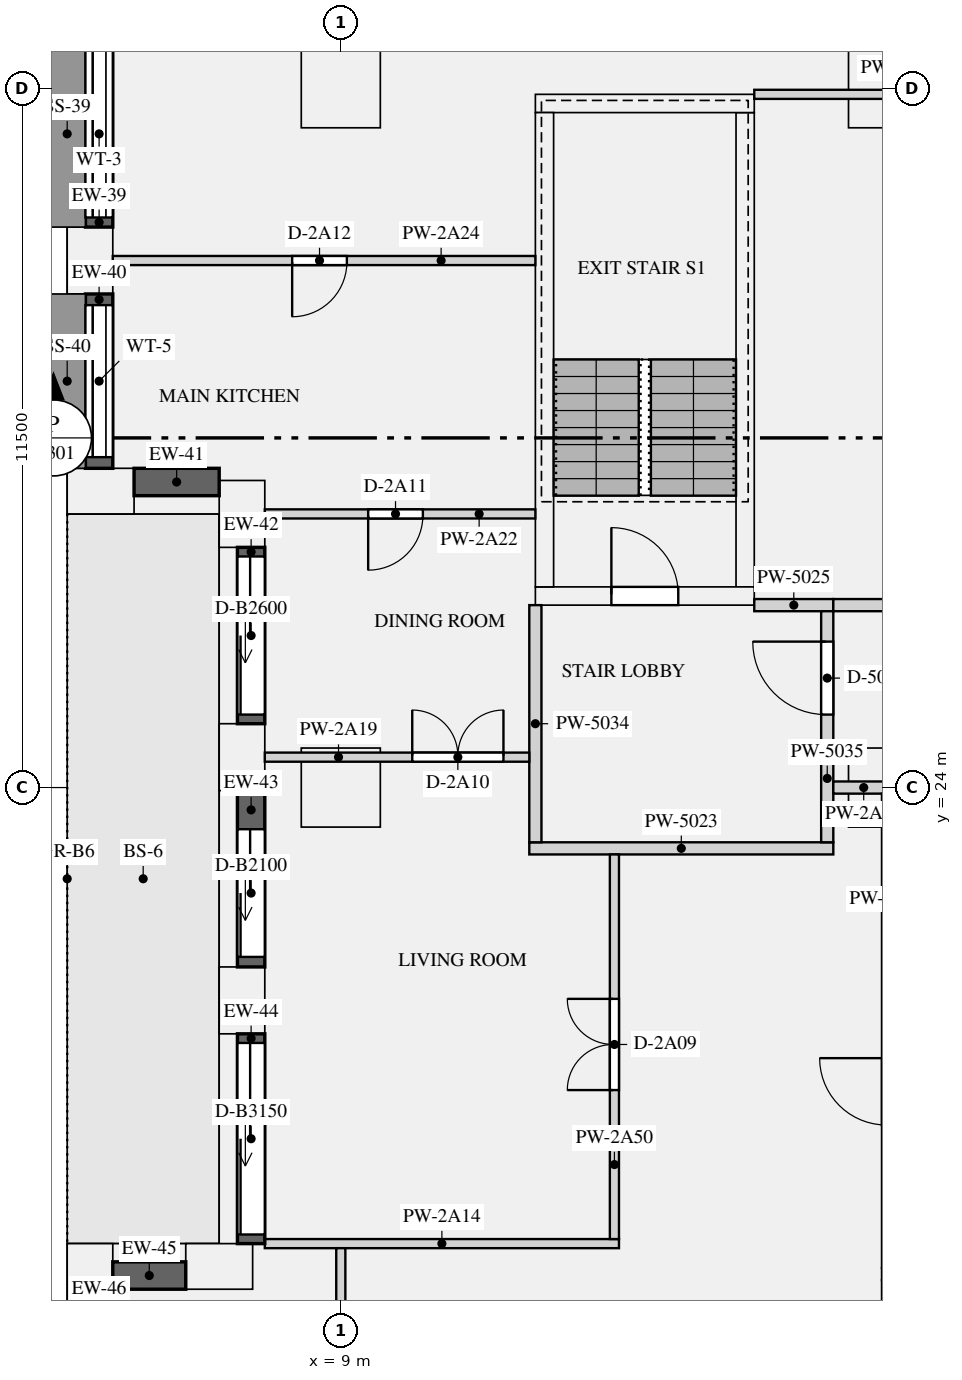
"""IFC4 building model, lengths in metres.
Left out: names, types, materials, properties, quantities, classifications, styles, units other than length and angle.
Written with IfcOpenShell. Run it as: python <this file> out.ifc"""

import sys

from ifc_helpers import new_model, si_unit, direction, frame, frame_2d, origin, origin_2d, place, context, subcontext, project, spatial, rectangle, extrude, element, fill, save


model = new_model("IFC4")
c1 = context("Model", 3, precision=1e-05, world=origin(), true_north=direction((0.0, 1.0)))
c2 = subcontext(c1, "Body", "Model", "MODEL_VIEW")
j1 = project(units=[si_unit("LENGTHUNIT", "METRE"), si_unit("PLANEANGLEUNIT", "RADIAN")], contexts=[c1])
p1 = place(None, origin())
s1 = spatial("IfcSite", under=j1, at=p1, CompositionType="ELEMENT")
p2 = place(p1, origin())
s2 = spatial("IfcBuilding", under=s1, at=p2, CompositionType="ELEMENT")
p3 = place(p2, frame((0.0, 0.0, 83.55)))
s3 = spatial("IfcBuildingStorey", under=s2, at=p3, CompositionType="ELEMENT", Elevation=83.55)
for number, where, z_axis, x_axis in (
    (1, (4.875, 32.667, 0.0), (0.0, 0.0, 1.0), (0.0, -1.0, 0.0)),
    (2, (5.05, 28.875, 0.0), (0.0, 0.0, 1.0), (1.0, 0.0, 0.0)),
    (3, (7.375, 28.5, 0.0), (0.0, 0.0, 1.0), (0.0, -1.0, 0.0)),
    (4, (7.375, 24.5, 0.0), (0.0, 0.0, 1.0), (0.0, -1.0, 0.0)),
    (5, (7.375, 20.5, 0.0), (0.0, 0.0, 1.0), (0.0, -1.0, 0.0)),
    (6, (7.0, 16.125, 0.0), (0.0, 0.0, 1.0), (-1.0, 0.0, 0.0)),
    (7, (4.875, 15.95, 0.0), (0.0, 0.0, 1.0), (0.0, -1.0, 0.0)),
):
    element("IfcColumn", number, at=place(p3, frame(where, z_axis=z_axis, x_axis=x_axis)), inside=s3, PredefinedType="USERDEFINED", context=c2, shape_type="SweptSolid", body=[
        extrude(rectangle(XDim=1.1, YDim=0.75, at=origin_2d()), origin(), (0.0, 0.0, 1.0), 3.15),
    ])
for number, where, z_axis, x_axis in (
    (8, (9.0, 24.0, 0.0), (0.0, 0.0, 1.0), (1.0, 0.0, 0.0)),
    (9, (18.0, 24.0, 0.0), (0.0, 0.0, 1.0), (1.0, 0.0, 0.0)),
    (10, (9.0, 35.5, 0.0), (0.0, 0.0, 1.0), (1.0, 0.0, 0.0)),
    (11, (18.0, 35.5, 0.0), (0.0, 0.0, 1.0), (1.0, 0.0, 0.0)),
):
    element("IfcColumn", number, at=place(p3, frame(where, z_axis=z_axis, x_axis=x_axis)), inside=s3, PredefinedType="COLUMN", context=c2, shape_type="SweptSolid", body=[
        extrude(rectangle(XDim=1.3, YDim=1.3, at=origin_2d()), origin(), (0.0, 0.0, 1.0), 3.15),
    ])
p4 = place(p3, frame((12.2, 27.15, 0.0), z_axis=(0.0, 0.0, 1.0), x_axis=(1.0, 0.0, 0.0)))
e12 = element("IfcWall", 12, at=p4, inside=s3, PredefinedType="SHEAR", context=c2, shape_type="SweptSolid", body=[
    extrude(rectangle(XDim=3.6, YDim=0.3, at=frame_2d((1.8, 0.0))), origin(), (0.0, 0.0, 1.0), 3.15),
])
p5 = place(p4, frame((1.25, 0.0, 0.0)))
e13 = element("IfcOpeningElement", 13, at=p5, cuts=e12, PredefinedType="OPENING", context=c2, shape_type="SweptSolid", body=[
    extrude(rectangle(XDim=1.1, YDim=2.1, at=frame_2d((0.55, 1.05))), frame((0.0, 0.16, 0.0), z_axis=(0.0, -1.0, 0.0), x_axis=(1.0, 0.0, 0.0)), (0.0, 0.0, 1.0), 0.32),
])
p6 = place(p3, frame((12.2, 35.25, 0.0), z_axis=(0.0, 0.0, 1.0), x_axis=(1.0, 0.0, 0.0)))
e14 = element("IfcWall", 14, at=p6, inside=s3, PredefinedType="SHEAR", context=c2, shape_type="SweptSolid", body=[
    extrude(rectangle(XDim=3.6, YDim=0.3, at=frame_2d((1.8, 0.0))), origin(), (0.0, 0.0, 1.0), 3.15),
])
for number, where, z_axis, x_axis in (
    (15, (12.35, 27.3, 0.0), (0.0, 0.0, 1.0), (0.0, 1.0, 0.0)),
    (16, (15.65, 27.3, 0.0), (0.0, 0.0, 1.0), (0.0, 1.0, 0.0)),
):
    element("IfcWall", number, at=place(p3, frame(where, z_axis=z_axis, x_axis=x_axis)), inside=s3, PredefinedType="SHEAR", context=c2, shape_type="SweptSolid", body=[
        extrude(rectangle(XDim=7.8, YDim=0.3, at=frame_2d((3.9, 0.0))), origin(), (0.0, 0.0, 1.0), 3.15),
    ])
p7 = place(p3, frame((5.025, 36.283, 0.9), z_axis=(0.0, 0.0, 1.0), x_axis=(0.0, -1.0, 0.0)))
e17 = element("IfcWall", 17, at=p7, inside=s3, PredefinedType="SOLIDWALL", context=c2, shape_type="SweptSolid", body=[
    extrude(rectangle(XDim=3.066, YDim=0.45, at=frame_2d((1.533, 0.0))), origin(), (0.0, 0.0, 1.0), 1.93),
])
p8 = place(p7, frame((0.158, 0.0, 0.15)))
e18 = element("IfcOpeningElement", 18, at=p8, cuts=e17, PredefinedType="OPENING", context=c2, shape_type="SweptSolid", body=[
    extrude(rectangle(XDim=2.75, YDim=1.5, at=frame_2d((1.375, 0.75))), frame((0.0, 0.235, 0.0), z_axis=(0.0, -1.0, 0.0), x_axis=(1.0, 0.0, 0.0)), (0.0, 0.0, 1.0), 0.47),
])
p9 = place(p3, frame((5.025, 32.117, 0.9), z_axis=(0.0, 0.0, 1.0), x_axis=(0.0, -1.0, 0.0)))
e19 = element("IfcWall", 19, at=p9, inside=s3, PredefinedType="SOLIDWALL", context=c2, shape_type="SweptSolid", body=[
    extrude(rectangle(XDim=2.867, YDim=0.45, at=frame_2d((1.434, 0.0))), origin(), (0.0, 0.0, 1.0), 1.93),
])
p10 = place(p9, frame((0.184, 0.0, 0.15)))
e20 = element("IfcOpeningElement", 20, at=p10, cuts=e19, PredefinedType="OPENING", context=c2, shape_type="SweptSolid", body=[
    extrude(rectangle(XDim=2.5, YDim=1.5, at=frame_2d((1.25, 0.75))), frame((0.0, 0.235, 0.0), z_axis=(0.0, -1.0, 0.0), x_axis=(1.0, 0.0, 0.0)), (0.0, 0.0, 1.0), 0.47),
])
p11 = place(p3, frame((5.6, 29.025, 0.9), z_axis=(0.0, 0.0, 1.0), x_axis=(1.0, 0.0, 0.0)))
e21 = element("IfcWall", 21, at=p11, inside=s3, PredefinedType="SOLIDWALL", context=c2, shape_type="SweptSolid", body=[
    extrude(rectangle(XDim=1.4, YDim=0.45, at=frame_2d((0.7, 0.0))), origin(), (0.0, 0.0, 1.0), 1.93),
])
p12 = place(p3, frame((7.525, 27.95, 0.0), z_axis=(0.0, 0.0, 1.0), x_axis=(0.0, -1.0, 0.0)))
e22 = element("IfcWall", 22, at=p12, inside=s3, PredefinedType="SOLIDWALL", context=c2, shape_type="SweptSolid", body=[
    extrude(rectangle(XDim=2.9, YDim=0.45, at=frame_2d((1.45, 0.0))), origin(), (0.0, 0.0, 1.0), 2.83),
])
p13 = place(p12, frame((0.15, 0.0, 0.0)))
e23 = element("IfcOpeningElement", 23, at=p13, cuts=e22, PredefinedType="OPENING", context=c2, shape_type="SweptSolid", body=[
    extrude(rectangle(XDim=2.6, YDim=2.3, at=frame_2d((1.3, 1.15))), frame((0.0, 0.235, 0.0), z_axis=(0.0, -1.0, 0.0), x_axis=(1.0, 0.0, 0.0)), (0.0, 0.0, 1.0), 0.47),
])
p14 = place(p3, frame((7.525, 23.95, 0.0), z_axis=(0.0, 0.0, 1.0), x_axis=(0.0, -1.0, 0.0)))
e24 = element("IfcWall", 24, at=p14, inside=s3, PredefinedType="SOLIDWALL", context=c2, shape_type="SweptSolid", body=[
    extrude(rectangle(XDim=2.9, YDim=0.45, at=frame_2d((1.45, 0.0))), origin(), (0.0, 0.0, 1.0), 2.83),
])
p15 = place(p14, frame((0.635, 0.0, 0.0)))
e25 = element("IfcOpeningElement", 25, at=p15, cuts=e24, PredefinedType="OPENING", context=c2, shape_type="SweptSolid", body=[
    extrude(rectangle(XDim=2.1, YDim=2.3, at=frame_2d((1.05, 1.15))), frame((0.0, 0.235, 0.0), z_axis=(0.0, -1.0, 0.0), x_axis=(1.0, 0.0, 0.0)), (0.0, 0.0, 1.0), 0.47),
])
p16 = place(p3, frame((7.525, 19.95, 0.0), z_axis=(0.0, 0.0, 1.0), x_axis=(0.0, -1.0, 0.0)))
e26 = element("IfcWall", 26, at=p16, inside=s3, PredefinedType="SOLIDWALL", context=c2, shape_type="SweptSolid", body=[
    extrude(rectangle(XDim=3.45, YDim=0.45, at=frame_2d((1.725, 0.0))), origin(), (0.0, 0.0, 1.0), 2.83),
])
p17 = place(p16, frame((0.15, 0.0, 0.0)))
e27 = element("IfcOpeningElement", 27, at=p17, cuts=e26, PredefinedType="OPENING", context=c2, shape_type="SweptSolid", body=[
    extrude(rectangle(XDim=3.15, YDim=2.3, at=frame_2d((1.575, 1.15))), frame((0.0, 0.235, 0.0), z_axis=(0.0, -1.0, 0.0), x_axis=(1.0, 0.0, 0.0)), (0.0, 0.0, 1.0), 0.47),
])
p18 = place(p3, frame((6.45, 15.975, 0.9), z_axis=(0.0, 0.0, 1.0), x_axis=(-1.0, 0.0, 0.0)))
e28 = element("IfcWall", 28, at=p18, inside=s3, PredefinedType="SOLIDWALL", context=c2, shape_type="SweptSolid", body=[
    extrude(rectangle(XDim=1.2, YDim=0.45, at=frame_2d((0.6, 0.0))), origin(), (0.0, 0.0, 1.0), 1.93),
])
p19 = place(p3, frame((12.1, 23.0, 0.0), z_axis=(0.0, 0.0, 1.0), x_axis=(1.0, 0.0, 0.0)))
e29 = element("IfcWall", 29, at=p19, inside=s3, PredefinedType="PARTITIONING", context=c2, shape_type="SweptSolid", body=[
    extrude(rectangle(XDim=5.0, YDim=0.2, at=frame_2d((2.5, 0.0))), origin(), (0.0, 0.0, 1.0), 2.83),
])
p20 = place(p3, frame((15.8, 27.0, 0.0), z_axis=(0.0, 0.0, 1.0), x_axis=(1.0, 0.0, 0.0)))
e30 = element("IfcWall", 30, at=p20, inside=s3, PredefinedType="PARTITIONING", context=c2, shape_type="SweptSolid", body=[
    extrude(rectangle(XDim=1.3, YDim=0.2, at=frame_2d((0.65, 0.0))), origin(), (0.0, 0.0, 1.0), 2.83),
])
p21 = place(p3, frame((12.2, 23.1, 0.0), z_axis=(0.0, 0.0, 1.0), x_axis=(0.0, 1.0, 0.0)))
e31 = element("IfcWall", 31, at=p21, inside=s3, PredefinedType="PARTITIONING", context=c2, shape_type="SweptSolid", body=[
    extrude(rectangle(XDim=3.9, YDim=0.2, at=frame_2d((1.95, 0.0))), origin(), (0.0, 0.0, 1.0), 2.83),
])
p22 = place(p3, frame((17.0, 23.1, 0.0), z_axis=(0.0, 0.0, 1.0), x_axis=(0.0, 1.0, 0.0)))
e32 = element("IfcWall", 32, at=p22, inside=s3, PredefinedType="PARTITIONING", context=c2, shape_type="SweptSolid", body=[
    extrude(rectangle(XDim=3.8, YDim=0.2, at=frame_2d((1.9, 0.0))), origin(), (0.0, 0.0, 1.0), 2.83),
])
p23 = place(p22, frame((2.1, 0.0, 0.0)))
e33 = element("IfcOpeningElement", 33, at=p23, cuts=e32, PredefinedType="OPENING", context=c2, shape_type="SweptSolid", body=[
    extrude(rectangle(XDim=1.2, YDim=2.1, at=frame_2d((0.6, 1.05))), frame((0.0, 0.11, 0.0), z_axis=(0.0, -1.0, 0.0), x_axis=(1.0, 0.0, 0.0)), (0.0, 0.0, 1.0), 0.22),
])
p24 = place(p3, frame((17.1, 24.0, 0.0), z_axis=(0.0, 0.0, 1.0), x_axis=(1.0, 0.0, 0.0)))
e34 = element("IfcWall", 34, at=p24, inside=s3, PredefinedType="PARTITIONING", context=c2, shape_type="SweptSolid", body=[
    extrude(rectangle(XDim=1.0, YDim=0.2, at=frame_2d((0.5, 0.0))), origin(), (0.0, 0.0, 1.0), 2.83),
])
p25 = place(p3, frame((17.1, 27.0, 0.0), z_axis=(0.0, 0.0, 1.0), x_axis=(1.0, 0.0, 0.0)))
e35 = element("IfcWall", 35, at=p25, inside=s3, PredefinedType="PARTITIONING", context=c2, shape_type="SweptSolid", body=[
    extrude(rectangle(XDim=7.0, YDim=0.2, at=frame_2d((3.5, 0.0))), origin(), (0.0, 0.0, 1.0), 2.83),
])
p26 = place(p3, frame((7.75, 16.5, 0.0), z_axis=(0.0, 0.0, 1.0), x_axis=(1.0, 0.0, 0.0)))
e36 = element("IfcWall", 36, at=p26, inside=s3, PredefinedType="PARTITIONING", context=c2, shape_type="SweptSolid", body=[
    extrude(rectangle(XDim=5.825, YDim=0.15, at=frame_2d((2.913, 0.0))), origin(), (0.0, 0.0, 1.0), 2.83),
])
p27 = place(p3, frame((7.75, 24.5, 0.0), z_axis=(0.0, 0.0, 1.0), x_axis=(1.0, 0.0, 0.0)))
e37 = element("IfcWall", 37, at=p27, inside=s3, PredefinedType="PARTITIONING", context=c2, shape_type="SweptSolid", body=[
    extrude(rectangle(XDim=4.35, YDim=0.15, at=frame_2d((2.175, 0.0))), origin(), (0.0, 0.0, 1.0), 2.83),
])
p28 = place(p27, frame((2.425, 0.0, 0.0)))
e38 = element("IfcOpeningElement", 38, at=p28, cuts=e37, PredefinedType="OPENING", context=c2, shape_type="SweptSolid", body=[
    extrude(rectangle(XDim=1.5, YDim=2.1, at=frame_2d((0.75, 1.05))), frame((0.0, 0.085, 0.0), z_axis=(0.0, -1.0, 0.0), x_axis=(1.0, 0.0, 0.0)), (0.0, 0.0, 1.0), 0.17),
])
p29 = place(p3, frame((7.75, 28.5, 0.0), z_axis=(0.0, 0.0, 1.0), x_axis=(1.0, 0.0, 0.0)))
e39 = element("IfcWall", 39, at=p29, inside=s3, PredefinedType="PARTITIONING", context=c2, shape_type="SweptSolid", body=[
    extrude(rectangle(XDim=4.45, YDim=0.15, at=frame_2d((2.225, 0.0))), origin(), (0.0, 0.0, 1.0), 2.83),
])
p30 = place(p29, frame((1.7, 0.0, 0.0)))
e40 = element("IfcOpeningElement", 40, at=p30, cuts=e39, PredefinedType="OPENING", context=c2, shape_type="SweptSolid", body=[
    extrude(rectangle(XDim=0.9, YDim=2.1, at=frame_2d((0.45, 1.05))), frame((0.0, 0.085, 0.0), z_axis=(0.0, -1.0, 0.0), x_axis=(1.0, 0.0, 0.0)), (0.0, 0.0, 1.0), 0.17),
])
p31 = place(p3, frame((5.25, 32.667, 0.0), z_axis=(0.0, 0.0, 1.0), x_axis=(1.0, 0.0, 0.0)))
e41 = element("IfcWall", 41, at=p31, inside=s3, PredefinedType="PARTITIONING", context=c2, shape_type="SweptSolid", body=[
    extrude(rectangle(XDim=6.95, YDim=0.15, at=frame_2d((3.475, 0.0))), origin(), (0.0, 0.0, 1.0), 2.83),
])
p32 = place(p31, frame((2.95, 0.0, 0.0)))
e42 = element("IfcOpeningElement", 42, at=p32, cuts=e41, PredefinedType="OPENING", context=c2, shape_type="SweptSolid", body=[
    extrude(rectangle(XDim=0.9, YDim=2.1, at=frame_2d((0.45, 1.05))), frame((0.0, 0.085, 0.0), z_axis=(0.0, -1.0, 0.0), x_axis=(1.0, 0.0, 0.0)), (0.0, 0.0, 1.0), 0.17),
])
p33 = place(p3, frame((15.8, 35.4, 0.0), z_axis=(0.0, 0.0, 1.0), x_axis=(1.0, 0.0, 0.0)))
e43 = element("IfcWall", 43, at=p33, inside=s3, PredefinedType="PARTITIONING", context=c2, shape_type="SweptSolid", body=[
    extrude(rectangle(XDim=8.1, YDim=0.15, at=frame_2d((4.05, 0.0))), origin(), (0.0, 0.0, 1.0), 2.83),
])
p34 = place(p33, frame((4.775, 0.0, 0.0)))
e44 = element("IfcOpeningElement", 44, at=p34, cuts=e43, PredefinedType="OPENING", context=c2, shape_type="SweptSolid", body=[
    extrude(rectangle(XDim=1.5, YDim=2.1, at=frame_2d((0.75, 1.05))), frame((0.0, 0.085, 0.0), z_axis=(0.0, -1.0, 0.0), x_axis=(1.0, 0.0, 0.0)), (0.0, 0.0, 1.0), 0.17),
])
p35 = place(p3, frame((13.5, 16.575, 0.0), z_axis=(0.0, 0.0, 1.0), x_axis=(0.0, 1.0, 0.0)))
e45 = element("IfcWall", 45, at=p35, inside=s3, PredefinedType="PARTITIONING", context=c2, shape_type="SweptSolid", body=[
    extrude(rectangle(XDim=6.325, YDim=0.15, at=frame_2d((3.163, 0.0))), origin(), (0.0, 0.0, 1.0), 2.83),
])
p36 = place(p35, frame((2.45, 0.0, 0.0)))
e46 = element("IfcOpeningElement", 46, at=p36, cuts=e45, PredefinedType="OPENING", context=c2, shape_type="SweptSolid", body=[
    extrude(rectangle(XDim=1.5, YDim=2.1, at=frame_2d((0.75, 1.05))), frame((0.0, 0.085, 0.0), z_axis=(0.0, -1.0, 0.0), x_axis=(1.0, 0.0, 0.0)), (0.0, 0.0, 1.0), 0.17),
])
p37 = place(p3, frame((9.0, 8.575, 0.0), z_axis=(0.0, 0.0, 1.0), x_axis=(0.0, 1.0, 0.0)))
e47 = element("IfcWall", 47, at=p37, inside=s3, PredefinedType="PARTITIONING", context=c2, shape_type="SweptSolid", body=[
    extrude(rectangle(XDim=7.85, YDim=0.15, at=frame_2d((3.925, 0.0))), origin(), (0.0, 0.0, 1.0), 2.83),
])
p38 = place(p37, frame((1.15, 0.0, 0.0)))
e48 = element("IfcOpeningElement", 48, at=p38, cuts=e47, PredefinedType="OPENING", context=c2, shape_type="SweptSolid", body=[
    extrude(rectangle(XDim=0.9, YDim=2.1, at=frame_2d((0.45, 1.05))), frame((0.0, 0.085, 0.0), z_axis=(0.0, -1.0, 0.0), x_axis=(1.0, 0.0, 0.0)), (0.0, 0.0, 1.0), 0.17),
])
p39 = place(p8, origin())
e49 = element("IfcWindow", 49, at=p39, inside=s3, PartitioningType="SINGLE_PANEL", PredefinedType="WINDOW", context=c2, shape_type="SweptSolid", body=[
    extrude(rectangle(XDim=2.75, YDim=1.5, at=frame_2d((1.375, 0.75))), frame((0.0, -0.065, 0.0), z_axis=(0.0, -1.0, 0.0), x_axis=(1.0, 0.0, 0.0)), (0.0, 0.0, 1.0), 0.06),
])
fill(e18, e49)
p40 = place(p10, origin())
e50 = element("IfcWindow", 50, at=p40, inside=s3, PartitioningType="SINGLE_PANEL", PredefinedType="WINDOW", context=c2, shape_type="SweptSolid", body=[
    extrude(rectangle(XDim=2.5, YDim=1.5, at=frame_2d((1.25, 0.75))), frame((0.0, -0.065, 0.0), z_axis=(0.0, -1.0, 0.0), x_axis=(1.0, 0.0, 0.0)), (0.0, 0.0, 1.0), 0.06),
])
fill(e20, e50)
p41 = place(p13, origin())
e51 = element("IfcDoor", 51, at=p41, inside=s3, OperationType="SLIDING_TO_LEFT", PredefinedType="DOOR", context=c2, shape_type="SweptSolid", body=[
    extrude(rectangle(XDim=2.6, YDim=2.3, at=frame_2d((1.3, 1.15))), frame((0.0, -0.07, 0.0), z_axis=(0.0, -1.0, 0.0), x_axis=(1.0, 0.0, 0.0)), (0.0, 0.0, 1.0), 0.05),
])
fill(e23, e51)
p42 = place(p15, origin())
e52 = element("IfcDoor", 52, at=p42, inside=s3, OperationType="SLIDING_TO_LEFT", PredefinedType="DOOR", context=c2, shape_type="SweptSolid", body=[
    extrude(rectangle(XDim=2.1, YDim=2.3, at=frame_2d((1.05, 1.15))), frame((0.0, -0.07, 0.0), z_axis=(0.0, -1.0, 0.0), x_axis=(1.0, 0.0, 0.0)), (0.0, 0.0, 1.0), 0.05),
])
fill(e25, e52)
p43 = place(p17, origin())
e53 = element("IfcDoor", 53, at=p43, inside=s3, OperationType="SLIDING_TO_LEFT", PredefinedType="DOOR", context=c2, shape_type="SweptSolid", body=[
    extrude(rectangle(XDim=3.15, YDim=2.3, at=frame_2d((1.575, 1.15))), frame((0.0, -0.07, 0.0), z_axis=(0.0, -1.0, 0.0), x_axis=(1.0, 0.0, 0.0)), (0.0, 0.0, 1.0), 0.05),
])
fill(e27, e53)
p44 = place(p5, origin())
e54 = element("IfcDoor", 54, at=p44, inside=s3, OperationType="SINGLE_SWING_LEFT", PredefinedType="DOOR", context=c2, shape_type="SweptSolid", body=[
    extrude(rectangle(XDim=1.1, YDim=2.1, at=frame_2d((0.55, 1.05))), frame((0.0, 0.025, 0.0), z_axis=(0.0, -1.0, 0.0), x_axis=(1.0, 0.0, 0.0)), (0.0, 0.0, 1.0), 0.05),
])
fill(e13, e54)
p45 = place(p23, origin())
e55 = element("IfcDoor", 55, at=p45, inside=s3, OperationType="SINGLE_SWING_RIGHT", PredefinedType="DOOR", context=c2, shape_type="SweptSolid", body=[
    extrude(rectangle(XDim=1.2, YDim=2.1, at=frame_2d((0.6, 1.05))), frame((0.0, 0.025, 0.0), z_axis=(0.0, -1.0, 0.0), x_axis=(1.0, 0.0, 0.0)), (0.0, 0.0, 1.0), 0.05),
])
fill(e33, e55)
p46 = place(p36, origin())
e56 = element("IfcDoor", 56, at=p46, inside=s3, OperationType="DOUBLE_DOOR_SINGLE_SWING", PredefinedType="DOOR", context=c2, shape_type="SweptSolid", body=[
    extrude(rectangle(XDim=1.5, YDim=2.1, at=frame_2d((0.75, 1.05))), frame((0.0, 0.025, 0.0), z_axis=(0.0, -1.0, 0.0), x_axis=(1.0, 0.0, 0.0)), (0.0, 0.0, 1.0), 0.05),
])
fill(e46, e56)
p47 = place(p28, origin())
e57 = element("IfcDoor", 57, at=p47, inside=s3, OperationType="DOUBLE_DOOR_SINGLE_SWING", PredefinedType="DOOR", context=c2, shape_type="SweptSolid", body=[
    extrude(rectangle(XDim=1.5, YDim=2.1, at=frame_2d((0.75, 1.05))), frame((0.0, 0.025, 0.0), z_axis=(0.0, -1.0, 0.0), x_axis=(1.0, 0.0, 0.0)), (0.0, 0.0, 1.0), 0.05),
])
fill(e38, e57)
p48 = place(p30, frame((0.9, 0.0, 0.0), z_axis=(0.0, 0.0, 1.0), x_axis=(-1.0, 0.0, 0.0)))
e58 = element("IfcDoor", 58, at=p48, inside=s3, OperationType="SINGLE_SWING_RIGHT", PredefinedType="DOOR", context=c2, shape_type="SweptSolid", body=[
    extrude(rectangle(XDim=0.9, YDim=2.1, at=frame_2d((0.45, 1.05))), frame((0.0, 0.025, 0.0), z_axis=(0.0, -1.0, 0.0), x_axis=(1.0, 0.0, 0.0)), (0.0, 0.0, 1.0), 0.05),
])
fill(e40, e58)
p49 = place(p32, frame((0.9, 0.0, 0.0), z_axis=(0.0, 0.0, 1.0), x_axis=(-1.0, 0.0, 0.0)))
e59 = element("IfcDoor", 59, at=p49, inside=s3, OperationType="SINGLE_SWING_RIGHT", PredefinedType="DOOR", context=c2, shape_type="SweptSolid", body=[
    extrude(rectangle(XDim=0.9, YDim=2.1, at=frame_2d((0.45, 1.05))), frame((0.0, 0.025, 0.0), z_axis=(0.0, -1.0, 0.0), x_axis=(1.0, 0.0, 0.0)), (0.0, 0.0, 1.0), 0.05),
])
fill(e42, e59)
save(model, sys.argv[1])
